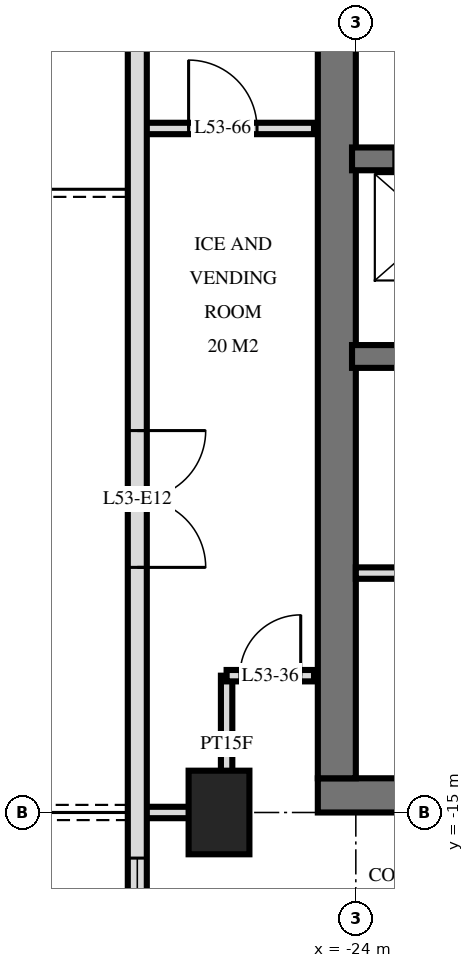
"""IFC4 building model, lengths in metres.
Left out: names, types, materials, properties, quantities, classifications, styles, units other than length and angle.
Written with IfcOpenShell. Run it as: python <this file> out.ifc"""

import sys

from ifc_helpers import new_model, si_unit, direction, frame, frame_2d, origin, origin_2d, place, context, subcontext, project, spatial, rectangle, extrude, element, fill, save


model = new_model("IFC4")
c1 = context("Model", 3, precision=1e-05, world=origin(), true_north=direction((0.0, 1.0)))
c2 = subcontext(c1, "Body", "Model", "MODEL_VIEW")
j1 = project(units=[si_unit("LENGTHUNIT", "METRE"), si_unit("PLANEANGLEUNIT", "RADIAN")], contexts=[c1])
p1 = place(None, origin())
s1 = spatial("IfcSite", under=j1, at=p1, CompositionType="ELEMENT")
p2 = place(p1, origin())
s2 = spatial("IfcBuilding", under=s1, at=p2, CompositionType="ELEMENT")
p3 = place(p2, frame((0.0, 0.0, 204.6)))
s3 = spatial("IfcBuildingStorey", under=s2, at=p3, CompositionType="ELEMENT", Elevation=204.6)
p4 = place(p3, frame((-25.8, -15.0, 0.0), z_axis=(0.0, 0.0, 1.0), x_axis=(0.0, 1.0, 0.0)))
e1 = element("IfcColumn", 1, at=p4, inside=s3, PredefinedType="COLUMN", context=c2, shape_type="SweptSolid", body=[
    extrude(rectangle(XDim=1.1, YDim=0.8, at=origin_2d()), origin(), (0.0, 0.0, 1.0), 3.5),
])
p5 = place(p3, frame((-24.5, -14.775, 0.0), z_axis=(0.0, 0.0, 1.0), x_axis=(1.0, 0.0, 0.0)))
e2 = element("IfcWall", 2, at=p5, inside=s3, PredefinedType="SHEAR", context=c2, shape_type="SweptSolid", body=[
    extrude(rectangle(XDim=14.5, YDim=0.45, at=frame_2d((7.25, 0.0))), origin(), (0.0, 0.0, 1.0), 3.5),
])
p6 = place(p5, frame((6.2, 0.0, 0.0)))
e3 = element("IfcOpeningElement", 3, at=p6, cuts=e2, PredefinedType="OPENING", context=c2, shape_type="SweptSolid", body=[
    extrude(rectangle(XDim=1.2, YDim=2.1, at=frame_2d((0.6, 1.05))), frame((0.0, 0.235, 0.0), z_axis=(0.0, -1.0, 0.0), x_axis=(1.0, 0.0, 0.0)), (0.0, 0.0, 1.0), 0.47),
])
p7 = place(p5, frame((9.25, 0.0, 0.0)))
e4 = element("IfcOpeningElement", 4, at=p7, cuts=e2, PredefinedType="OPENING", context=c2, shape_type="SweptSolid", body=[
    extrude(rectangle(XDim=1.1, YDim=2.1, at=frame_2d((0.55, 1.05))), frame((0.0, 0.235, 0.0), z_axis=(0.0, -1.0, 0.0), x_axis=(1.0, 0.0, 0.0)), (0.0, 0.0, 1.0), 0.47),
])
p8 = place(p5, frame((3.5, 0.0, 0.0)))
e5 = element("IfcOpeningElement", 5, at=p8, cuts=e2, PredefinedType="OPENING", context=c2, shape_type="SweptSolid", body=[
    extrude(rectangle(XDim=0.9, YDim=2.1, at=frame_2d((0.45, 1.05))), frame((0.0, 0.235, 0.0), z_axis=(0.0, -1.0, 0.0), x_axis=(1.0, 0.0, 0.0)), (0.0, 0.0, 1.0), 0.47),
])
p9 = place(p5, frame((1.05, 0.0, 0.0)))
e6 = element("IfcOpeningElement", 6, at=p9, cuts=e2, PredefinedType="OPENING", context=c2, shape_type="SweptSolid", body=[
    extrude(rectangle(XDim=1.0, YDim=2.1, at=frame_2d((0.5, 1.05))), frame((0.0, 0.235, 0.0), z_axis=(0.0, -1.0, 0.0), x_axis=(1.0, 0.0, 0.0)), (0.0, 0.0, 1.0), 0.47),
])
p10 = place(p3, frame((-24.25, -14.55, 0.0), z_axis=(0.0, 0.0, 1.0), x_axis=(0.0, 1.0, 0.0)))
e7 = element("IfcWall", 7, at=p10, inside=s3, PredefinedType="SHEAR", context=c2, shape_type="SweptSolid", body=[
    extrude(rectangle(XDim=14.1, YDim=0.5, at=frame_2d((7.05, 0.0))), origin(), (0.0, 0.0, 1.0), 3.5),
])
p11 = place(p3, frame((-24.05, -6.4, 0.0), z_axis=(0.0, 0.0, 1.0), x_axis=(1.0, 0.0, 0.0)))
e8 = element("IfcWall", 8, at=p11, inside=s3, PredefinedType="SHEAR", context=c2, shape_type="SweptSolid", body=[
    extrude(rectangle(XDim=13.7, YDim=0.3, at=frame_2d((6.85, 0.0))), origin(), (0.0, 0.0, 1.0), 3.5),
])
p12 = place(p11, frame((0.55, 0.0, 0.0)))
e9 = element("IfcOpeningElement", 9, at=p12, cuts=e8, PredefinedType="OPENING", context=c2, shape_type="SweptSolid", body=[
    extrude(rectangle(XDim=1.1, YDim=2.1, at=frame_2d((0.55, 1.05))), frame((0.0, 0.16, 0.0), z_axis=(0.0, -1.0, 0.0), x_axis=(1.0, 0.0, 0.0)), (0.0, 0.0, 1.0), 0.32),
])
p13 = place(p11, frame((5.8, 0.0, 0.0)))
e10 = element("IfcOpeningElement", 10, at=p13, cuts=e8, PredefinedType="OPENING", context=c2, shape_type="SweptSolid", body=[
    extrude(rectangle(XDim=1.1, YDim=2.1, at=frame_2d((0.55, 1.05))), frame((0.0, 0.16, 0.0), z_axis=(0.0, -1.0, 0.0), x_axis=(1.0, 0.0, 0.0)), (0.0, 0.0, 1.0), 0.32),
])
p14 = place(p3, frame((-24.05, -9.0, 0.0), z_axis=(0.0, 0.0, 1.0), x_axis=(1.0, 0.0, 0.0)))
e11 = element("IfcWall", 11, at=p14, inside=s3, PredefinedType="SHEAR", context=c2, shape_type="SweptSolid", body=[
    extrude(rectangle(XDim=13.7, YDim=0.3, at=frame_2d((6.85, 0.0))), origin(), (0.0, 0.0, 1.0), 3.5),
])
p15 = place(p14, frame((8.8, 0.0, 0.0)))
e12 = element("IfcOpeningElement", 12, at=p15, cuts=e11, PredefinedType="OPENING", context=c2, shape_type="SweptSolid", body=[
    extrude(rectangle(XDim=1.1, YDim=2.1, at=frame_2d((0.55, 1.05))), frame((0.0, 0.16, 0.0), z_axis=(0.0, -1.0, 0.0), x_axis=(1.0, 0.0, 0.0)), (0.0, 0.0, 1.0), 0.32),
])
p16 = place(p3, frame((-26.875, -3.325, 0.0), z_axis=(0.0, 0.0, 1.0), x_axis=(0.0, -1.0, 0.0)))
e13 = element("IfcWall", 13, at=p16, inside=s3, PredefinedType="SOLIDWALL", context=c2, shape_type="SweptSolid", body=[
    extrude(rectangle(XDim=21.551, YDim=0.25, at=frame_2d((10.775, 0.0))), origin(), (0.0, 0.0, 1.0), 3.22),
])
p17 = place(p16, frame((6.65, 0.0, 0.0)))
e14 = element("IfcOpeningElement", 14, at=p17, cuts=e13, PredefinedType="OPENING", context=c2, shape_type="SweptSolid", body=[
    extrude(rectangle(XDim=1.8, YDim=2.4, at=frame_2d((0.9, 1.2))), frame((0.0, 0.135, 0.0), z_axis=(0.0, -1.0, 0.0), x_axis=(1.0, 0.0, 0.0)), (0.0, 0.0, 1.0), 0.27),
])
p18 = place(p16, frame((12.275, 0.0, 0.9)))
e15 = element("IfcOpeningElement", 15, at=p18, cuts=e13, PredefinedType="OPENING", context=c2, shape_type="SweptSolid", body=[
    extrude(rectangle(XDim=1.2, YDim=1.5, at=frame_2d((0.6, 0.75))), frame((0.0, 0.135, 0.0), z_axis=(0.0, -1.0, 0.0), x_axis=(1.0, 0.0, 0.0)), (0.0, 0.0, 1.0), 0.27),
])
p19 = place(p16, frame((14.675, 0.0, 0.0)))
e16 = element("IfcOpeningElement", 16, at=p19, cuts=e13, PredefinedType="OPENING", context=c2, shape_type="SweptSolid", body=[
    extrude(rectangle(XDim=1.8, YDim=2.4, at=frame_2d((0.9, 1.2))), frame((0.0, 0.135, 0.0), z_axis=(0.0, -1.0, 0.0), x_axis=(1.0, 0.0, 0.0)), (0.0, 0.0, 1.0), 0.27),
])
p20 = place(p16, frame((18.875, 0.0, 0.0)))
e17 = element("IfcOpeningElement", 17, at=p20, cuts=e13, PredefinedType="OPENING", context=c2, shape_type="SweptSolid", body=[
    extrude(rectangle(XDim=1.8, YDim=2.4, at=frame_2d((0.9, 1.2))), frame((0.0, 0.135, 0.0), z_axis=(0.0, -1.0, 0.0), x_axis=(1.0, 0.0, 0.0)), (0.0, 0.0, 1.0), 0.27),
])
p21 = place(p3, frame((-24.0, -11.85, 0.0), z_axis=(0.0, 0.0, 1.0), x_axis=(1.0, 0.0, 0.0)))
e18 = element("IfcWall", 18, at=p21, inside=s3, PredefinedType="PARTITIONING", context=c2, shape_type="SweptSolid", body=[
    extrude(rectangle(XDim=2.1, YDim=0.15, at=frame_2d((1.05, 0.0))), origin(), (0.0, 0.0, 1.0), 3.2),
])
p22 = place(p21, frame((0.55, 0.0, 0.0)))
e19 = element("IfcOpeningElement", 19, at=p22, cuts=e18, PredefinedType="OPENING", context=c2, shape_type="SweptSolid", body=[
    extrude(rectangle(XDim=1.0, YDim=2.1, at=frame_2d((0.5, 1.05))), frame((0.0, 0.085, 0.0), z_axis=(0.0, -1.0, 0.0), x_axis=(1.0, 0.0, 0.0)), (0.0, 0.0, 1.0), 0.17),
])
p23 = place(p3, frame((-25.7, -15.0, 0.0), z_axis=(0.0, 0.0, 1.0), x_axis=(0.0, 1.0, 0.0)))
e20 = element("IfcWall", 20, at=p23, inside=s3, PredefinedType="PARTITIONING", context=c2, shape_type="SweptSolid", body=[
    extrude(rectangle(XDim=1.8, YDim=0.15, at=frame_2d((0.9, 0.0))), origin(), (0.0, 0.0, 1.0), 3.22),
])
p24 = place(p3, frame((-26.82, -15.0, 0.0), z_axis=(0.0, 0.0, 1.0), x_axis=(1.0, 0.0, 0.0)))
e21 = element("IfcWall", 21, at=p24, inside=s3, PredefinedType="PARTITIONING", context=c2, shape_type="SweptSolid", body=[
    extrude(rectangle(XDim=1.12, YDim=0.15, at=frame_2d((0.56, 0.0))), origin(), (0.0, 0.0, 1.0), 3.22),
])
p25 = place(p3, frame((-25.7, -13.2, 0.0), z_axis=(0.0, 0.0, 1.0), x_axis=(1.0, 0.0, 0.0)))
e22 = element("IfcWall", 22, at=p25, inside=s3, PredefinedType="PARTITIONING", context=c2, shape_type="SweptSolid", body=[
    extrude(rectangle(XDim=1.15, YDim=0.15, at=frame_2d((0.575, 0.0))), origin(), (0.0, 0.0, 1.0), 3.22),
])
p26 = place(p25, frame((0.175, 0.0, 0.0)))
e23 = element("IfcOpeningElement", 23, at=p26, cuts=e22, PredefinedType="OPENING", context=c2, shape_type="SweptSolid", body=[
    extrude(rectangle(XDim=0.8, YDim=2.1, at=frame_2d((0.4, 1.05))), frame((0.0, 0.085, 0.0), z_axis=(0.0, -1.0, 0.0), x_axis=(1.0, 0.0, 0.0)), (0.0, 0.0, 1.0), 0.17),
])
p27 = place(p3, frame((-26.82, -6.0, 0.0), z_axis=(0.0, 0.0, 1.0), x_axis=(1.0, 0.0, 0.0)))
e24 = element("IfcWall", 24, at=p27, inside=s3, PredefinedType="PARTITIONING", context=c2, shape_type="SweptSolid", body=[
    extrude(rectangle(XDim=2.27, YDim=0.15, at=frame_2d((1.135, 0.0))), origin(), (0.0, 0.0, 1.0), 3.22),
])
p28 = place(p27, frame((0.62, 0.0, 0.0)))
e25 = element("IfcOpeningElement", 25, at=p28, cuts=e24, PredefinedType="OPENING", context=c2, shape_type="SweptSolid", body=[
    extrude(rectangle(XDim=0.9, YDim=2.1, at=frame_2d((0.45, 1.05))), frame((0.0, 0.085, 0.0), z_axis=(0.0, -1.0, 0.0), x_axis=(1.0, 0.0, 0.0)), (0.0, 0.0, 1.0), 0.17),
])
p29 = place(p17, origin())
e26 = element("IfcDoor", 26, at=p29, inside=s3, OperationType="DOUBLE_DOOR_SINGLE_SWING", PredefinedType="DOOR", context=c2, shape_type="SweptSolid", body=[
    extrude(rectangle(XDim=1.8, YDim=2.4, at=frame_2d((0.9, 1.2))), frame((0.0, 0.025, 0.0), z_axis=(0.0, -1.0, 0.0), x_axis=(1.0, 0.0, 0.0)), (0.0, 0.0, 1.0), 0.05),
])
fill(e14, e26)
p30 = place(p18, origin())
e27 = element("IfcWindow", 27, at=p30, inside=s3, PartitioningType="SINGLE_PANEL", PredefinedType="WINDOW", context=c2, shape_type="SweptSolid", body=[
    extrude(rectangle(XDim=1.2, YDim=1.5, at=frame_2d((0.6, 0.75))), frame((0.0, 0.03, 0.0), z_axis=(0.0, -1.0, 0.0), x_axis=(1.0, 0.0, 0.0)), (0.0, 0.0, 1.0), 0.06),
])
fill(e15, e27)
p31 = place(p26, origin())
e28 = element("IfcDoor", 28, at=p31, inside=s3, OperationType="SINGLE_SWING_LEFT", PredefinedType="DOOR", context=c2, shape_type="SweptSolid", body=[
    extrude(rectangle(XDim=0.8, YDim=2.1, at=frame_2d((0.4, 1.05))), frame((0.0, 0.025, 0.0), z_axis=(0.0, -1.0, 0.0), x_axis=(1.0, 0.0, 0.0)), (0.0, 0.0, 1.0), 0.05),
])
fill(e23, e28)
p32 = place(p28, origin())
e29 = element("IfcDoor", 29, at=p32, inside=s3, OperationType="SINGLE_SWING_RIGHT", PredefinedType="DOOR", context=c2, shape_type="SweptSolid", body=[
    extrude(rectangle(XDim=0.9, YDim=2.1, at=frame_2d((0.45, 1.05))), frame((0.0, 0.025, 0.0), z_axis=(0.0, -1.0, 0.0), x_axis=(1.0, 0.0, 0.0)), (0.0, 0.0, 1.0), 0.05),
])
fill(e25, e29)
save(model, sys.argv[1])
